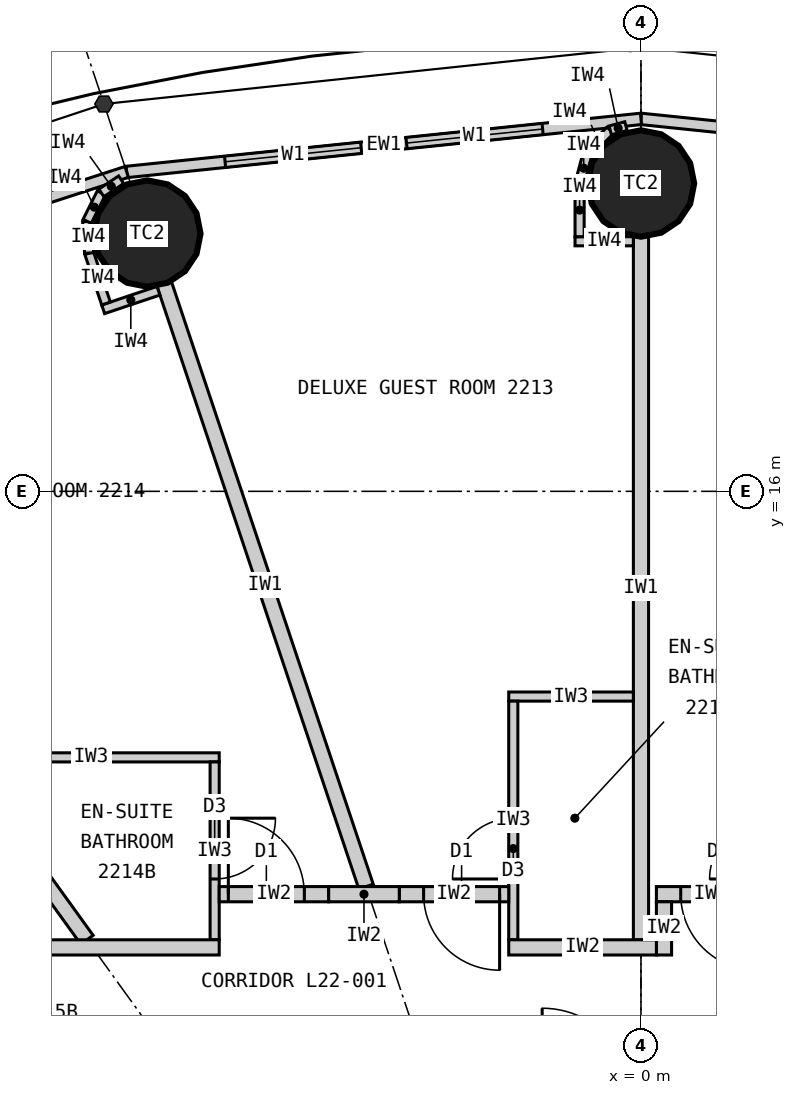
"""IFC4 building model, lengths in metres.
Left out: names, types, materials, properties, quantities, classifications, styles, units other than length and angle.
Written with IfcOpenShell. Run it as: python <this file> out.ifc"""

import sys

from ifc_helpers import new_model, si_unit, direction, frame, frame_2d, origin, origin_2d, place, context, subcontext, project, spatial, rectangle, circle, extrude, element, fill, save


model = new_model("IFC4")
c1 = context("Model", 3, precision=1e-05, world=origin(), true_north=direction((0.0, 1.0)))
c2 = subcontext(c1, "Body", "Model", "MODEL_VIEW")
j1 = project(units=[si_unit("LENGTHUNIT", "METRE"), si_unit("PLANEANGLEUNIT", "RADIAN")], contexts=[c1])
p1 = place(None, origin())
s1 = spatial("IfcSite", under=j1, at=p1, CompositionType="ELEMENT")
p2 = place(p1, origin())
s2 = spatial("IfcBuilding", under=s1, at=p2, CompositionType="ELEMENT")
p3 = place(p2, frame((0.0, 0.0, 87.0)))
s3 = spatial("IfcBuildingStorey", under=s2, at=p3, CompositionType="ELEMENT", Elevation=87.0)
for number, where, z_axis, x_axis in (
    (1, (0.0, 20.05, 0.0), (0.0, 0.0, 1.0), (1.0, 0.0, 0.0)),
    (2, (-6.495, 19.391, 0.0), (0.0, 0.0, 1.0), (1.0, 0.0, 0.0)),
):
    element("IfcColumn", number, at=place(p3, frame(where, z_axis=z_axis, x_axis=x_axis)), inside=s3, PredefinedType="COLUMN", context=c2, shape_type="SweptSolid", body=[
        extrude(circle(Radius=0.7, at=origin_2d()), origin(), (0.0, 0.0, 1.0), 3.3),
    ])
p4 = place(p3, frame((6.766, 20.202, 0.0), z_axis=(0.0, 0.0, 1.0), x_axis=(-0.994721394369, 0.102612609291, 0.0)))
e3 = element("IfcWall", 3, at=p4, inside=s3, PredefinedType="ELEMENTEDWALL", context=c2, shape_type="SweptSolid", body=[
    extrude(rectangle(XDim=6.802, YDim=0.15, at=frame_2d((3.401, 0.0))), origin(), (0.0, 0.0, 1.0), 3.12),
])
p5 = place(p4, frame((1.301, 0.0, 0.9)))
e4 = element("IfcOpeningElement", 4, at=p5, cuts=e3, PredefinedType="OPENING", context=c2, shape_type="SweptSolid", body=[
    extrude(rectangle(XDim=1.8, YDim=1.9, at=frame_2d((0.9, 0.95))), frame((0.0, 0.085, 0.0), z_axis=(0.0, -1.0, 0.0), x_axis=(1.0, 0.0, 0.0)), (0.0, 0.0, 1.0), 0.17),
])
p6 = place(p4, frame((3.701, 0.0, 0.9)))
e5 = element("IfcOpeningElement", 5, at=p6, cuts=e3, PredefinedType="OPENING", context=c2, shape_type="SweptSolid", body=[
    extrude(rectangle(XDim=1.8, YDim=1.9, at=frame_2d((0.9, 0.95))), frame((0.0, 0.085, 0.0), z_axis=(0.0, -1.0, 0.0), x_axis=(1.0, 0.0, 0.0)), (0.0, 0.0, 1.0), 0.17),
])
p7 = place(p3, frame((0.0, 20.9, 0.0), z_axis=(0.0, 0.0, 1.0), x_axis=(-0.994721394369, -0.102612609291, 0.0)))
e6 = element("IfcWall", 6, at=p7, inside=s3, PredefinedType="ELEMENTEDWALL", context=c2, shape_type="SweptSolid", body=[
    extrude(rectangle(XDim=6.802, YDim=0.15, at=frame_2d((3.401, 0.0))), origin(), (0.0, 0.0, 1.0), 3.12),
])
p8 = place(p7, frame((1.301, 0.0, 0.9)))
e7 = element("IfcOpeningElement", 7, at=p8, cuts=e6, PredefinedType="OPENING", context=c2, shape_type="SweptSolid", body=[
    extrude(rectangle(XDim=1.8, YDim=1.9, at=frame_2d((0.9, 0.95))), frame((0.0, 0.085, 0.0), z_axis=(0.0, -1.0, 0.0), x_axis=(1.0, 0.0, 0.0)), (0.0, 0.0, 1.0), 0.17),
])
p9 = place(p7, frame((3.701, 0.0, 0.9)))
e8 = element("IfcOpeningElement", 8, at=p9, cuts=e6, PredefinedType="OPENING", context=c2, shape_type="SweptSolid", body=[
    extrude(rectangle(XDim=1.8, YDim=1.9, at=frame_2d((0.9, 0.95))), frame((0.0, 0.085, 0.0), z_axis=(0.0, -1.0, 0.0), x_axis=(1.0, 0.0, 0.0)), (0.0, 0.0, 1.0), 0.17),
])
p10 = place(p3, frame((-6.766, 20.202, 0.0), z_axis=(0.0, 0.0, 1.0), x_axis=(-0.951137534625, -0.308767534285, 0.0)))
e9 = element("IfcWall", 9, at=p10, inside=s3, PredefinedType="ELEMENTEDWALL", context=c2, shape_type="SweptSolid", body=[
    extrude(rectangle(XDim=6.655, YDim=0.15, at=frame_2d((3.328, 0.0))), origin(), (0.0, 0.0, 1.0), 3.12),
])
p11 = place(p10, frame((1.228, 0.0, 0.9)))
e10 = element("IfcOpeningElement", 10, at=p11, cuts=e9, PredefinedType="OPENING", context=c2, shape_type="SweptSolid", body=[
    extrude(rectangle(XDim=1.8, YDim=1.9, at=frame_2d((0.9, 0.95))), frame((0.0, 0.085, 0.0), z_axis=(0.0, -1.0, 0.0), x_axis=(1.0, 0.0, 0.0)), (0.0, 0.0, 1.0), 0.17),
])
p12 = place(p10, frame((3.628, 0.0, 0.9)))
e11 = element("IfcOpeningElement", 11, at=p12, cuts=e9, PredefinedType="OPENING", context=c2, shape_type="SweptSolid", body=[
    extrude(rectangle(XDim=1.8, YDim=1.9, at=frame_2d((0.9, 0.95))), frame((0.0, 0.085, 0.0), z_axis=(0.0, -1.0, 0.0), x_axis=(1.0, 0.0, 0.0)), (0.0, 0.0, 1.0), 0.17),
])
p13 = place(p3, frame((0.0, 10.1, 0.0), z_axis=(0.0, 0.0, 1.0), x_axis=(0.0, 1.0, 0.0)))
e12 = element("IfcWall", 12, at=p13, inside=s3, PredefinedType="PARTITIONING", context=c2, shape_type="SweptSolid", body=[
    extrude(rectangle(XDim=9.25, YDim=0.2, at=frame_2d((4.625, 0.0))), origin(), (0.0, 0.0, 1.0), 2.27),
])
p14 = place(p3, frame((-3.617, 10.8, 0.0), z_axis=(0.0, 0.0, 1.0), x_axis=(-0.317576599239, 0.948232621046, 0.0)))
e13 = element("IfcWall", 13, at=p14, inside=s3, PredefinedType="PARTITIONING", context=c2, shape_type="SweptSolid", body=[
    extrude(rectangle(XDim=8.36, YDim=0.2, at=frame_2d((4.18, 0.0))), origin(), (0.0, 0.0, 1.0), 2.27),
])
p15 = place(p3, frame((-7.289, 10.1, 0.0), z_axis=(0.0, 0.0, 1.0), x_axis=(-0.585198353053, 0.810890182197, 0.0)))
e14 = element("IfcWall", 14, at=p15, inside=s3, PredefinedType="PARTITIONING", context=c2, shape_type="SweptSolid", body=[
    extrude(rectangle(XDim=8.36, YDim=0.2, at=frame_2d((4.18, 0.0))), origin(), (0.0, 0.0, 1.0), 2.27),
])
p16 = place(p3, frame((-0.1, 13.3, 0.0), z_axis=(0.0, 0.0, 1.0), x_axis=(-1.0, 0.0, 0.0)))
e15 = element("IfcWall", 15, at=p16, inside=s3, PredefinedType="PARTITIONING", context=c2, shape_type="SweptSolid", body=[
    extrude(rectangle(XDim=1.64, YDim=0.12, at=frame_2d((0.82, 0.0))), origin(), (0.0, 0.0, 1.0), 3.12),
])
p17 = place(p3, frame((-1.68, 10.1, 0.0), z_axis=(0.0, 0.0, 1.0), x_axis=(0.0, 1.0, 0.0)))
e16 = element("IfcWall", 16, at=p17, inside=s3, PredefinedType="PARTITIONING", context=c2, shape_type="SweptSolid", body=[
    extrude(rectangle(XDim=3.14, YDim=0.12, at=frame_2d((1.57, 0.0))), origin(), (0.0, 0.0, 1.0), 3.12),
])
p18 = place(p17, frame((0.8, 0.0, 0.0)))
e17 = element("IfcOpeningElement", 17, at=p18, cuts=e16, PredefinedType="OPENING", context=c2, shape_type="SweptSolid", body=[
    extrude(rectangle(XDim=0.8, YDim=2.1, at=frame_2d((0.4, 1.05))), frame((0.0, 0.07, 0.0), z_axis=(0.0, -1.0, 0.0), x_axis=(1.0, 0.0, 0.0)), (0.0, 0.0, 1.0), 0.14),
])
p19 = place(p3, frame((-8.921, 12.5, 0.0), z_axis=(0.0, 0.0, 1.0), x_axis=(1.0, 0.0, 0.0)))
e18 = element("IfcWall", 18, at=p19, inside=s3, PredefinedType="PARTITIONING", context=c2, shape_type="SweptSolid", body=[
    extrude(rectangle(XDim=3.372, YDim=0.12, at=frame_2d((1.686, 0.0))), origin(), (0.0, 0.0, 1.0), 3.12),
])
p20 = place(p3, frame((-5.609, 10.1, 0.0), z_axis=(0.0, 0.0, 1.0), x_axis=(0.0, 1.0, 0.0)))
e19 = element("IfcWall", 19, at=p20, inside=s3, PredefinedType="PARTITIONING", context=c2, shape_type="SweptSolid", body=[
    extrude(rectangle(XDim=2.34, YDim=0.12, at=frame_2d((1.17, 0.0))), origin(), (0.0, 0.0, 1.0), 3.12),
])
p21 = place(p20, frame((0.8, 0.0, 0.0)))
e20 = element("IfcOpeningElement", 20, at=p21, cuts=e19, PredefinedType="OPENING", context=c2, shape_type="SweptSolid", body=[
    extrude(rectangle(XDim=0.8, YDim=2.1, at=frame_2d((0.4, 1.05))), frame((0.0, 0.07, 0.0), z_axis=(0.0, -1.0, 0.0), x_axis=(1.0, 0.0, 0.0)), (0.0, 0.0, 1.0), 0.14),
])
p22 = place(p3, frame((0.203, 10.7, 0.0), z_axis=(0.0, 0.0, 1.0), x_axis=(1.0, 0.0, 0.0)))
e21 = element("IfcWall", 21, at=p22, inside=s3, PredefinedType="PARTITIONING", context=c2, shape_type="SweptSolid", body=[
    extrude(rectangle(XDim=1.44, YDim=0.2, at=frame_2d((0.72, 0.0))), origin(), (0.0, 0.0, 1.0), 3.12),
])
p23 = place(p22, frame((0.32, 0.0, 0.0)))
e22 = element("IfcOpeningElement", 22, at=p23, cuts=e21, PredefinedType="OPENING", context=c2, shape_type="SweptSolid", body=[
    extrude(rectangle(XDim=1.0, YDim=2.2, at=frame_2d((0.5, 1.1))), frame((0.0, 0.11, 0.0), z_axis=(0.0, -1.0, 0.0), x_axis=(1.0, 0.0, 0.0)), (0.0, 0.0, 1.0), 0.22),
])
p24 = place(p3, frame((0.303, 9.9, 0.0), z_axis=(0.0, 0.0, 1.0), x_axis=(0.0, 1.0, 0.0)))
e23 = element("IfcWall", 23, at=p24, inside=s3, PredefinedType="PARTITIONING", context=c2, shape_type="SweptSolid", body=[
    extrude(rectangle(XDim=0.7, YDim=0.2, at=frame_2d((0.35, 0.0))), origin(), (0.0, 0.0, 1.0), 3.12),
])
p25 = place(p3, frame((-3.18, 10.7, 0.0), z_axis=(0.0, 0.0, 1.0), x_axis=(1.0, 0.0, 0.0)))
e24 = element("IfcWall", 24, at=p25, inside=s3, PredefinedType="PARTITIONING", context=c2, shape_type="SweptSolid", body=[
    extrude(rectangle(XDim=1.44, YDim=0.2, at=frame_2d((0.72, 0.0))), origin(), (0.0, 0.0, 1.0), 3.12),
])
p26 = place(p25, frame((0.32, 0.0, 0.0)))
e25 = element("IfcOpeningElement", 25, at=p26, cuts=e24, PredefinedType="OPENING", context=c2, shape_type="SweptSolid", body=[
    extrude(rectangle(XDim=1.0, YDim=2.2, at=frame_2d((0.5, 1.1))), frame((0.0, 0.11, 0.0), z_axis=(0.0, -1.0, 0.0), x_axis=(1.0, 0.0, 0.0)), (0.0, 0.0, 1.0), 0.22),
])
p27 = place(p3, frame((-5.549, 10.7, 0.0), z_axis=(0.0, 0.0, 1.0), x_axis=(1.0, 0.0, 0.0)))
e26 = element("IfcWall", 26, at=p27, inside=s3, PredefinedType="PARTITIONING", context=c2, shape_type="SweptSolid", body=[
    extrude(rectangle(XDim=1.44, YDim=0.2, at=frame_2d((0.72, 0.0))), origin(), (0.0, 0.0, 1.0), 3.12),
])
p28 = place(p27, frame((0.12, 0.0, 0.0)))
e27 = element("IfcOpeningElement", 27, at=p28, cuts=e26, PredefinedType="OPENING", context=c2, shape_type="SweptSolid", body=[
    extrude(rectangle(XDim=1.0, YDim=2.2, at=frame_2d((0.5, 1.1))), frame((0.0, 0.11, 0.0), z_axis=(0.0, -1.0, 0.0), x_axis=(1.0, 0.0, 0.0)), (0.0, 0.0, 1.0), 0.22),
])
p29 = place(p3, frame((-4.109, 10.7, 0.0), z_axis=(0.0, 0.0, 1.0), x_axis=(1.0, 0.0, 0.0)))
e28 = element("IfcWall", 28, at=p29, inside=s3, PredefinedType="PARTITIONING", context=c2, shape_type="SweptSolid", body=[
    extrude(rectangle(XDim=0.929, YDim=0.2, at=frame_2d((0.465, 0.0))), origin(), (0.0, 0.0, 1.0), 3.12),
])
p30 = place(p3, frame((-10.179, 10.0, 0.0), z_axis=(0.0, 0.0, 1.0), x_axis=(1.0, 0.0, 0.0)))
e29 = element("IfcWall", 29, at=p30, inside=s3, PredefinedType="PARTITIONING", context=c2, shape_type="SweptSolid", body=[
    extrude(rectangle(XDim=4.63, YDim=0.2, at=frame_2d((2.315, 0.0))), origin(), (0.0, 0.0, 1.0), 3.12),
])
p31 = place(p3, frame((-1.74, 10.0, 0.0), z_axis=(0.0, 0.0, 1.0), x_axis=(1.0, 0.0, 0.0)))
e30 = element("IfcWall", 30, at=p31, inside=s3, PredefinedType="PARTITIONING", context=c2, shape_type="SweptSolid", body=[
    extrude(rectangle(XDim=1.943, YDim=0.2, at=frame_2d((0.971, 0.0))), origin(), (0.0, 0.0, 1.0), 3.12),
])
p32 = place(p3, frame((-0.1, 19.29, 0.0), z_axis=(0.0, 0.0, 1.0), x_axis=(-1.0, 0.0, 0.0)))
e31 = element("IfcWall", 31, at=p32, inside=s3, PredefinedType="PARTITIONING", context=c2, shape_type="SweptSolid", body=[
    extrude(rectangle(XDim=0.767, YDim=0.12, at=frame_2d((0.384, 0.0))), origin(), (0.0, 0.0, 1.0), 3.12),
])
p33 = place(p3, frame((-0.808, 19.35, 0.0), z_axis=(0.0, 0.0, 1.0), x_axis=(0.0, 1.0, 0.0)))
e32 = element("IfcWall", 32, at=p33, inside=s3, PredefinedType="PARTITIONING", context=c2, shape_type="SweptSolid", body=[
    extrude(rectangle(XDim=0.7, YDim=0.12, at=frame_2d((0.35, 0.0))), origin(), (0.0, 0.0, 1.0), 3.12),
])
p34 = place(p3, frame((-0.808, 20.05, 0.0), z_axis=(0.0, 0.0, 1.0), x_axis=(0.2592614205, 0.965807183573, 0.0)))
e33 = element("IfcWall", 33, at=p34, inside=s3, PredefinedType="PARTITIONING", context=c2, shape_type="SweptSolid", body=[
    extrude(rectangle(XDim=0.418, YDim=0.12, at=frame_2d((0.209, 0.0))), origin(), (0.0, 0.0, 1.0), 3.12),
])
p35 = place(p3, frame((-0.699, 20.454, 0.0), z_axis=(0.0, 0.0, 1.0), x_axis=(0.707106781187, 0.707106781187, 0.0)))
e34 = element("IfcWall", 34, at=p35, inside=s3, PredefinedType="PARTITIONING", context=c2, shape_type="SweptSolid", body=[
    extrude(rectangle(XDim=0.418, YDim=0.12, at=frame_2d((0.209, 0.0))), origin(), (0.0, 0.0, 1.0), 3.12),
])
p36 = place(p3, frame((-0.404, 20.749, 0.0), z_axis=(0.0, 0.0, 1.0), x_axis=(0.965759066438, 0.25944060128, 0.0)))
e35 = element("IfcWall", 35, at=p36, inside=s3, PredefinedType="PARTITIONING", context=c2, shape_type="SweptSolid", body=[
    extrude(rectangle(XDim=0.214, YDim=0.12, at=frame_2d((0.107, 0.0))), origin(), (0.0, 0.0, 1.0), 3.12),
])
p37 = place(p3, frame((-6.348, 18.639, 0.0), z_axis=(0.0, 0.0, 1.0), x_axis=(-0.948268951266, -0.317468102437, 0.0)))
e36 = element("IfcWall", 36, at=p37, inside=s3, PredefinedType="PARTITIONING", context=c2, shape_type="SweptSolid", body=[
    extrude(rectangle(XDim=0.768, YDim=0.12, at=frame_2d((0.384, 0.0))), origin(), (0.0, 0.0, 1.0), 3.12),
])
p38 = place(p3, frame((-7.038, 18.471, 0.0), z_axis=(0.0, 0.0, 1.0), x_axis=(-0.317378466199, 0.9482989556, 0.0)))
e37 = element("IfcWall", 37, at=p38, inside=s3, PredefinedType="PARTITIONING", context=c2, shape_type="SweptSolid", body=[
    extrude(rectangle(XDim=0.7, YDim=0.12, at=frame_2d((0.35, 0.0))), origin(), (0.0, 0.0, 1.0), 3.12),
])
p39 = place(p3, frame((-7.26, 19.135, 0.0), z_axis=(0.0, 0.0, 1.0), x_axis=(-0.0613238046, 0.99811792439, 0.0)))
e38 = element("IfcWall", 38, at=p39, inside=s3, PredefinedType="PARTITIONING", context=c2, shape_type="SweptSolid", body=[
    extrude(rectangle(XDim=0.418, YDim=0.12, at=frame_2d((0.209, 0.0))), origin(), (0.0, 0.0, 1.0), 3.12),
])
p40 = place(p3, frame((-7.286, 19.552, 0.0), z_axis=(0.0, 0.0, 1.0), x_axis=(0.445810757773, 0.89512723579, 0.0)))
e39 = element("IfcWall", 39, at=p40, inside=s3, PredefinedType="PARTITIONING", context=c2, shape_type="SweptSolid", body=[
    extrude(rectangle(XDim=0.418, YDim=0.12, at=frame_2d((0.209, 0.0))), origin(), (0.0, 0.0, 1.0), 3.12),
])
p41 = place(p3, frame((-7.1, 19.926, 0.0), z_axis=(0.0, 0.0, 1.0), x_axis=(0.833488262509, 0.552537162787, 0.0)))
e40 = element("IfcWall", 40, at=p41, inside=s3, PredefinedType="PARTITIONING", context=c2, shape_type="SweptSolid", body=[
    extrude(rectangle(XDim=0.313, YDim=0.12, at=frame_2d((0.156, 0.0))), origin(), (0.0, 0.0, 1.0), 3.12),
])
p42 = place(p8, origin())
e41 = element("IfcWindow", 41, at=p42, inside=s3, PartitioningType="SINGLE_PANEL", PredefinedType="WINDOW", context=c2, shape_type="SweptSolid", body=[
    extrude(rectangle(XDim=1.8, YDim=1.9, at=frame_2d((0.9, 0.95))), frame((0.0, 0.03, 0.0), z_axis=(0.0, -1.0, 0.0), x_axis=(1.0, 0.0, 0.0)), (0.0, 0.0, 1.0), 0.06),
])
fill(e7, e41)
p43 = place(p9, origin())
e42 = element("IfcWindow", 42, at=p43, inside=s3, PartitioningType="SINGLE_PANEL", PredefinedType="WINDOW", context=c2, shape_type="SweptSolid", body=[
    extrude(rectangle(XDim=1.8, YDim=1.9, at=frame_2d((0.9, 0.95))), frame((0.0, 0.03, 0.0), z_axis=(0.0, -1.0, 0.0), x_axis=(1.0, 0.0, 0.0)), (0.0, 0.0, 1.0), 0.06),
])
fill(e8, e42)
p44 = place(p23, origin())
e43 = element("IfcDoor", 43, at=p44, inside=s3, OperationType="SINGLE_SWING_RIGHT", PredefinedType="DOOR", context=c2, shape_type="SweptSolid", body=[
    extrude(rectangle(XDim=1.0, YDim=2.2, at=frame_2d((0.5, 1.1))), frame((0.0, 0.025, 0.0), z_axis=(0.0, -1.0, 0.0), x_axis=(1.0, 0.0, 0.0)), (0.0, 0.0, 1.0), 0.05),
])
fill(e22, e43)
p45 = place(p18, origin())
e44 = element("IfcDoor", 44, at=p45, inside=s3, OperationType="SINGLE_SWING_LEFT", PredefinedType="DOOR", context=c2, shape_type="SweptSolid", body=[
    extrude(rectangle(XDim=0.8, YDim=2.1, at=frame_2d((0.4, 1.05))), frame((0.0, 0.025, 0.0), z_axis=(0.0, -1.0, 0.0), x_axis=(1.0, 0.0, 0.0)), (0.0, 0.0, 1.0), 0.05),
])
fill(e17, e44)
p46 = place(p26, origin())
e45 = element("IfcDoor", 45, at=p46, inside=s3, OperationType="SINGLE_SWING_RIGHT", PredefinedType="DOOR", context=c2, shape_type="SweptSolid", body=[
    extrude(rectangle(XDim=1.0, YDim=2.2, at=frame_2d((0.5, 1.1))), frame((0.0, 0.025, 0.0), z_axis=(0.0, -1.0, 0.0), x_axis=(1.0, 0.0, 0.0)), (0.0, 0.0, 1.0), 0.05),
])
fill(e25, e45)
p47 = place(p21, origin())
e46 = element("IfcDoor", 46, at=p47, inside=s3, OperationType="SINGLE_SWING_RIGHT", PredefinedType="DOOR", context=c2, shape_type="SweptSolid", body=[
    extrude(rectangle(XDim=0.8, YDim=2.1, at=frame_2d((0.4, 1.05))), frame((0.0, 0.025, 0.0), z_axis=(0.0, -1.0, 0.0), x_axis=(1.0, 0.0, 0.0)), (0.0, 0.0, 1.0), 0.05),
])
fill(e20, e46)
p48 = place(p28, origin())
e47 = element("IfcDoor", 47, at=p48, inside=s3, OperationType="SINGLE_SWING_LEFT", PredefinedType="DOOR", context=c2, shape_type="SweptSolid", body=[
    extrude(rectangle(XDim=1.0, YDim=2.2, at=frame_2d((0.5, 1.1))), frame((0.0, 0.025, 0.0), z_axis=(0.0, -1.0, 0.0), x_axis=(1.0, 0.0, 0.0)), (0.0, 0.0, 1.0), 0.05),
])
fill(e27, e47)
save(model, sys.argv[1])
